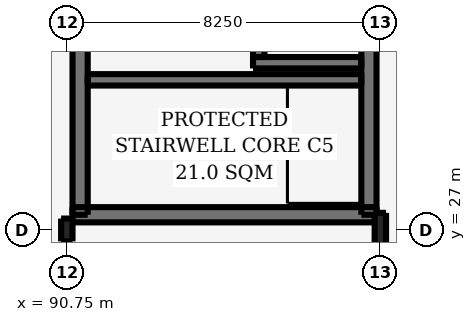
"""IFC4 building model, lengths in metres.
Left out: names, types, materials, properties, quantities, classifications, styles, units other than length and angle.
Written with IfcOpenShell. Run it as: python <this file> out.ifc"""

import sys

from ifc_helpers import new_model, si_unit, direction, frame, frame_2d, origin, origin_2d, place, context, subcontext, project, spatial, rectangle, i_section, extrude, element, fill, save


model = new_model("IFC4")
c1 = context("Model", 3, precision=1e-05, world=origin(), true_north=direction((0.0, 1.0)))
c2 = subcontext(c1, "Body", "Model", "MODEL_VIEW")
j1 = project(units=[si_unit("LENGTHUNIT", "METRE"), si_unit("PLANEANGLEUNIT", "RADIAN")], contexts=[c1])
p1 = place(None, origin())
s1 = spatial("IfcSite", under=j1, at=p1, CompositionType="ELEMENT")
p2 = place(p1, origin())
s2 = spatial("IfcBuilding", under=s1, at=p2, CompositionType="ELEMENT")
p3 = place(p2, frame((0.0, 0.0, -4.8)))
s3 = spatial("IfcBuildingStorey", under=s2, at=p3, CompositionType="ELEMENT", Elevation=-4.8)
p4 = place(p3, frame((90.75, 27.0, 0.0), z_axis=(0.0, 0.0, 1.0), x_axis=(1.0, 0.0, 0.0)))
e1 = element("IfcColumn", 1, at=p4, inside=s3, PredefinedType="COLUMN", context=c2, shape_type="SweptSolid", body=[
    extrude(i_section(OverallWidth=0.3, OverallDepth=0.6, WebThickness=0.015, FlangeThickness=0.03, FilletRadius=0.027, at=origin_2d()), origin(), (0.0, 0.0, 1.0), 4.8),
])
p5 = place(p3, frame((99.0, 27.0, 0.0), z_axis=(0.0, 0.0, 1.0), x_axis=(1.0, 0.0, 0.0)))
e2 = element("IfcColumn", 2, at=p5, inside=s3, PredefinedType="COLUMN", context=c2, shape_type="SweptSolid", body=[
    extrude(i_section(OverallWidth=0.3, OverallDepth=0.9, WebThickness=0.019, FlangeThickness=0.035, FilletRadius=0.03, at=origin_2d()), origin(), (0.0, 0.0, 1.0), 4.8),
])
p6 = place(p3, frame((90.9, 27.4, 0.0), z_axis=(0.0, 0.0, 1.0), x_axis=(1.0, 0.0, 0.0)))
e3 = element("IfcWall", 3, at=p6, inside=s3, PredefinedType="SHEAR", context=c2, shape_type="SweptSolid", body=[
    extrude(rectangle(XDim=8.0, YDim=0.4, at=frame_2d((4.0, 0.0))), origin(), (0.0, 0.0, 1.0), 4.8),
])
p7 = place(p6, frame((0.45, 0.0, 0.0)))
e4 = element("IfcOpeningElement", 4, at=p7, cuts=e3, PredefinedType="OPENING", context=c2, shape_type="SweptSolid", body=[
    extrude(rectangle(XDim=1.3, YDim=2.15, at=frame_2d((0.65, 1.075))), frame((0.0, 0.21, 0.0), z_axis=(0.0, -1.0, 0.0), x_axis=(1.0, 0.0, 0.0)), (0.0, 0.0, 1.0), 0.42),
])
for number, where, z_axis, x_axis in (
    (5, (91.1, 27.4, 0.0), (0.0, 0.0, 1.0), (0.0, 1.0, 0.0)),
    (6, (98.7, 27.4, 0.0), (0.0, 0.0, 1.0), (0.0, 1.0, 0.0)),
):
    element("IfcWall", number, at=place(p3, frame(where, z_axis=z_axis, x_axis=x_axis)), inside=s3, PredefinedType="SHEAR", context=c2, shape_type="SweptSolid", body=[
        extrude(rectangle(XDim=7.4, YDim=0.4, at=frame_2d((3.7, 0.0))), origin(), (0.0, 0.0, 1.0), 4.8),
    ])
p8 = place(p3, frame((91.3, 30.95, 0.0), z_axis=(0.0, 0.0, 1.0), x_axis=(1.0, 0.0, 0.0)))
e7 = element("IfcWall", 7, at=p8, inside=s3, PredefinedType="SHEAR", context=c2, shape_type="SweptSolid", body=[
    extrude(rectangle(XDim=7.2, YDim=0.3, at=frame_2d((3.6, 0.0))), origin(), (0.0, 0.0, 1.0), 4.8),
])
p9 = place(p3, frame((95.65, 31.4, 0.0), z_axis=(0.0, 0.0, 1.0), x_axis=(1.0, 0.0, 0.0)))
e8 = element("IfcWall", 8, at=p9, inside=s3, PredefinedType="SHEAR", context=c2, shape_type="SweptSolid", body=[
    extrude(rectangle(XDim=2.85, YDim=0.3, at=frame_2d((1.425, 0.0))), origin(), (0.0, 0.0, 1.0), 4.8),
])
p10 = place(p3, frame((95.8, 31.55, 0.0), z_axis=(0.0, 0.0, 1.0), x_axis=(0.0, 1.0, 0.0)))
e9 = element("IfcWall", 9, at=p10, inside=s3, PredefinedType="SHEAR", context=c2, shape_type="SweptSolid", body=[
    extrude(rectangle(XDim=3.05, YDim=0.3, at=frame_2d((1.525, 0.0))), origin(), (0.0, 0.0, 1.0), 4.8),
])
p11 = place(p10, frame((0.975, 0.0, 0.0)))
e10 = element("IfcOpeningElement", 10, at=p11, cuts=e9, PredefinedType="OPENING", context=c2, shape_type="SweptSolid", body=[
    extrude(rectangle(XDim=1.1, YDim=2.15, at=frame_2d((0.55, 1.075))), frame((0.0, 0.16, 0.0), z_axis=(0.0, -1.0, 0.0), x_axis=(1.0, 0.0, 0.0)), (0.0, 0.0, 1.0), 0.32),
])
p12 = place(p7, frame((1.3, 0.0, 0.0), z_axis=(0.0, 0.0, 1.0), x_axis=(-1.0, 0.0, 0.0)))
e11 = element("IfcDoor", 11, at=p12, inside=s3, OperationType="SINGLE_SWING_RIGHT", PredefinedType="DOOR", context=c2, shape_type="SweptSolid", body=[
    extrude(rectangle(XDim=1.3, YDim=2.15, at=frame_2d((0.65, 1.075))), frame((0.0, 0.025, 0.0), z_axis=(0.0, -1.0, 0.0), x_axis=(1.0, 0.0, 0.0)), (0.0, 0.0, 1.0), 0.05),
])
fill(e4, e11)
save(model, sys.argv[1])
